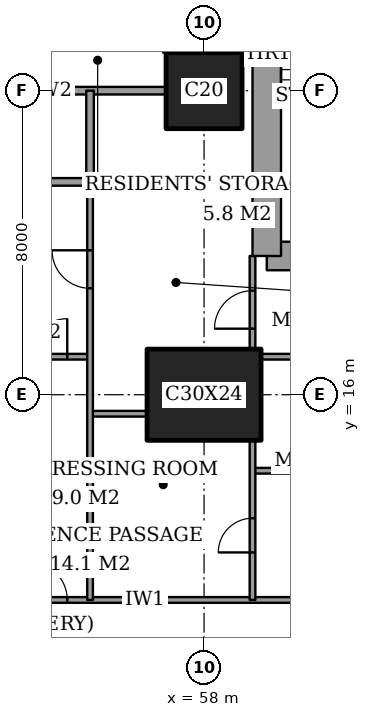
"""IFC4 building model, lengths in metres.
Left out: names, types, materials, properties, quantities, classifications, styles, units other than length and angle.
Written with IfcOpenShell. Run it as: python <this file> out.ifc"""

import sys

from ifc_helpers import new_model, si_unit, direction, frame, frame_2d, origin, origin_2d, place, context, subcontext, project, spatial, rectangle, extrude, element, fill, save


model = new_model("IFC4")
c1 = context("Model", 3, precision=1e-05, world=origin(), true_north=direction((0.0, 1.0)))
c2 = subcontext(c1, "Body", "Model", "MODEL_VIEW")
j1 = project(units=[si_unit("LENGTHUNIT", "METRE"), si_unit("PLANEANGLEUNIT", "RADIAN")], contexts=[c1])
p1 = place(None, origin())
s1 = spatial("IfcSite", under=j1, at=p1, CompositionType="ELEMENT")
p2 = place(p1, origin())
s2 = spatial("IfcBuilding", under=s1, at=p2, CompositionType="ELEMENT")
p3 = place(p2, frame((0.0, 0.0, 58.4)))
s3 = spatial("IfcBuildingStorey", under=s2, at=p3, CompositionType="ELEMENT", Elevation=58.4)
p4 = place(p3, frame((58.0, 16.0, 0.0), z_axis=(0.0, 0.0, 1.0), x_axis=(1.0, 0.0, 0.0)))
e1 = element("IfcColumn", 1, at=p4, inside=s3, PredefinedType="COLUMN", context=c2, shape_type="SweptSolid", body=[
    extrude(rectangle(XDim=3.0, YDim=2.4, at=origin_2d()), origin(), (0.0, 0.0, 1.0), 3.6),
])
p5 = place(p3, frame((58.0, 24.0, 0.0), z_axis=(0.0, 0.0, 1.0), x_axis=(1.0, 0.0, 0.0)))
e2 = element("IfcColumn", 2, at=p5, inside=s3, PredefinedType="COLUMN", context=c2, shape_type="SweptSolid", body=[
    extrude(rectangle(XDim=2.0, YDim=2.0, at=origin_2d()), origin(), (0.0, 0.0, 1.0), 3.6),
])
p6 = place(p3, frame((59.65, 19.65, 0.0), z_axis=(0.0, 0.0, 1.0), x_axis=(1.0, 0.0, 0.0)))
e3 = element("IfcWall", 3, at=p6, inside=s3, PredefinedType="SHEAR", context=c2, shape_type="SweptSolid", body=[
    extrude(rectangle(XDim=4.45, YDim=0.75, at=frame_2d((2.225, 0.0))), origin(), (0.0, 0.0, 1.0), 3.6),
])
p7 = place(p3, frame((59.65, 28.35, 0.0), z_axis=(0.0, 0.0, 1.0), x_axis=(0.0, -1.0, 0.0)))
e4 = element("IfcWall", 4, at=p7, inside=s3, PredefinedType="SHEAR", context=c2, shape_type="SweptSolid", body=[
    extrude(rectangle(XDim=8.7, YDim=0.75, at=frame_2d((4.35, 0.0))), origin(), (0.0, 0.0, 1.0), 3.6),
])
p8 = place(p7, frame((0.975, 0.0, 0.0)))
e5 = element("IfcOpeningElement", 5, at=p8, cuts=e4, PredefinedType="OPENING", context=c2, shape_type="SweptSolid", body=[
    extrude(rectangle(XDim=1.0, YDim=2.1, at=frame_2d((0.5, 1.05))), frame((0.0, 0.385, 0.0), z_axis=(0.0, -1.0, 0.0), x_axis=(1.0, 0.0, 0.0)), (0.0, 0.0, 1.0), 0.77),
])
p9 = place(p3, frame((41.439, 10.6, 0.0), z_axis=(0.0, 0.0, 1.0), x_axis=(1.0, 0.0, 0.0)))
e6 = element("IfcWall", 6, at=p9, inside=s3, PredefinedType="PARTITIONING", context=c2, shape_type="SweptSolid", body=[
    extrude(rectangle(XDim=25.011, YDim=0.15, at=frame_2d((12.505, 0.0))), origin(), (0.0, 0.0, 1.0), 3.35),
])
p10 = place(p9, frame((11.961, 0.0, 0.0)))
e7 = element("IfcOpeningElement", 7, at=p10, cuts=e6, PredefinedType="OPENING", context=c2, shape_type="SweptSolid", body=[
    extrude(rectangle(XDim=1.0, YDim=2.1, at=frame_2d((0.5, 1.05))), frame((0.0, 0.085, 0.0), z_axis=(0.0, -1.0, 0.0), x_axis=(1.0, 0.0, 0.0)), (0.0, 0.0, 1.0), 0.17),
])
p11 = place(p9, frame((20.924, 0.0, 0.0)))
e8 = element("IfcOpeningElement", 8, at=p11, cuts=e6, PredefinedType="OPENING", context=c2, shape_type="SweptSolid", body=[
    extrude(rectangle(XDim=1.0, YDim=2.1, at=frame_2d((0.5, 1.05))), frame((0.0, 0.085, 0.0), z_axis=(0.0, -1.0, 0.0), x_axis=(1.0, 0.0, 0.0)), (0.0, 0.0, 1.0), 0.17),
])
p12 = place(p9, frame((9.561, 0.0, 0.0)))
e9 = element("IfcOpeningElement", 9, at=p12, cuts=e6, PredefinedType="OPENING", context=c2, shape_type="SweptSolid", body=[
    extrude(rectangle(XDim=1.0, YDim=2.1, at=frame_2d((0.5, 1.05))), frame((0.0, 0.085, 0.0), z_axis=(0.0, -1.0, 0.0), x_axis=(1.0, 0.0, 0.0)), (0.0, 0.0, 1.0), 0.17),
])
p13 = place(p9, frame((7.161, 0.0, 0.0)))
e10 = element("IfcOpeningElement", 10, at=p13, cuts=e6, PredefinedType="OPENING", context=c2, shape_type="SweptSolid", body=[
    extrude(rectangle(XDim=1.0, YDim=2.1, at=frame_2d((0.5, 1.05))), frame((0.0, 0.085, 0.0), z_axis=(0.0, -1.0, 0.0), x_axis=(1.0, 0.0, 0.0)), (0.0, 0.0, 1.0), 0.17),
])
p14 = place(p9, frame((2.836, 0.0, 0.0)))
e11 = element("IfcOpeningElement", 11, at=p14, cuts=e6, PredefinedType="OPENING", context=c2, shape_type="SweptSolid", body=[
    extrude(rectangle(XDim=1.0, YDim=2.1, at=frame_2d((0.5, 1.05))), frame((0.0, 0.085, 0.0), z_axis=(0.0, -1.0, 0.0), x_axis=(1.0, 0.0, 0.0)), (0.0, 0.0, 1.0), 0.17),
])
p15 = place(p3, frame((59.275, 14.0, 0.0), z_axis=(0.0, 0.0, 1.0), x_axis=(1.0, 0.0, 0.0)))
e12 = element("IfcWall", 12, at=p15, inside=s3, PredefinedType="PARTITIONING", context=c2, shape_type="SweptSolid", body=[
    extrude(rectangle(XDim=2.6, YDim=0.15, at=frame_2d((1.3, 0.0))), origin(), (0.0, 0.0, 1.0), 3.35),
])
p16 = place(p3, frame((55.0, 15.5, 0.0), z_axis=(0.0, 0.0, 1.0), x_axis=(1.0, 0.0, 0.0)))
e13 = element("IfcWall", 13, at=p16, inside=s3, PredefinedType="PARTITIONING", context=c2, shape_type="SweptSolid", body=[
    extrude(rectangle(XDim=1.5, YDim=0.15, at=frame_2d((0.75, 0.0))), origin(), (0.0, 0.0, 1.0), 3.35),
])
p17 = place(p3, frame((51.6, 17.0, 0.0), z_axis=(0.0, 0.0, 1.0), x_axis=(1.0, 0.0, 0.0)))
e14 = element("IfcWall", 14, at=p17, inside=s3, PredefinedType="PARTITIONING", context=c2, shape_type="SweptSolid", body=[
    extrude(rectangle(XDim=3.4, YDim=0.15, at=frame_2d((1.7, 0.0))), origin(), (0.0, 0.0, 1.0), 3.35),
])
p18 = place(p17, frame((1.8, 0.0, 0.0)))
e15 = element("IfcOpeningElement", 15, at=p18, cuts=e14, PredefinedType="OPENING", context=c2, shape_type="SweptSolid", body=[
    extrude(rectangle(XDim=1.0, YDim=2.1, at=frame_2d((0.5, 1.05))), frame((0.0, 0.085, 0.0), z_axis=(0.0, -1.0, 0.0), x_axis=(1.0, 0.0, 0.0)), (0.0, 0.0, 1.0), 0.17),
])
p19 = place(p3, frame((59.5, 17.0, 0.0), z_axis=(0.0, 0.0, 1.0), x_axis=(1.0, 0.0, 0.0)))
e16 = element("IfcWall", 16, at=p19, inside=s3, PredefinedType="PARTITIONING", context=c2, shape_type="SweptSolid", body=[
    extrude(rectangle(XDim=5.15, YDim=0.15, at=frame_2d((2.575, 0.0))), origin(), (0.0, 0.0, 1.0), 3.35),
])
p20 = place(p3, frame((51.2, 21.6, 0.0), z_axis=(0.0, 0.0, 1.0), x_axis=(1.0, 0.0, 0.0)))
e17 = element("IfcWall", 17, at=p20, inside=s3, PredefinedType="PARTITIONING", context=c2, shape_type="SweptSolid", body=[
    extrude(rectangle(XDim=3.8, YDim=0.2, at=frame_2d((1.9, 0.0))), origin(), (0.0, 0.0, 1.0), 3.35),
])
p21 = place(p20, frame((1.45, 0.0, 0.0)))
e18 = element("IfcOpeningElement", 18, at=p21, cuts=e17, PredefinedType="OPENING", context=c2, shape_type="SweptSolid", body=[
    extrude(rectangle(XDim=0.9, YDim=2.1, at=frame_2d((0.45, 1.05))), frame((0.0, 0.11, 0.0), z_axis=(0.0, -1.0, 0.0), x_axis=(1.0, 0.0, 0.0)), (0.0, 0.0, 1.0), 0.22),
])
p22 = place(p3, frame((51.0, 24.0, 0.0), z_axis=(0.0, 0.0, 1.0), x_axis=(1.0, 0.0, 0.0)))
e19 = element("IfcWall", 19, at=p22, inside=s3, PredefinedType="PARTITIONING", context=c2, shape_type="SweptSolid", body=[
    extrude(rectangle(XDim=6.0, YDim=0.2, at=frame_2d((3.0, 0.0))), origin(), (0.0, 0.0, 1.0), 3.35),
])
p23 = place(p3, frame((55.0, 21.6, 0.0), z_axis=(0.0, 0.0, 1.0), x_axis=(0.0, 1.0, 0.0)))
e20 = element("IfcWall", 20, at=p23, inside=s3, PredefinedType="PARTITIONING", context=c2, shape_type="SweptSolid", body=[
    extrude(rectangle(XDim=2.4, YDim=0.2, at=frame_2d((1.2, 0.0))), origin(), (0.0, 0.0, 1.0), 3.35),
])
p24 = place(p3, frame((55.0, 10.6, 0.0), z_axis=(0.0, 0.0, 1.0), x_axis=(0.0, 1.0, 0.0)))
e21 = element("IfcWall", 21, at=p24, inside=s3, PredefinedType="PARTITIONING", context=c2, shape_type="SweptSolid", body=[
    extrude(rectangle(XDim=11.0, YDim=0.15, at=frame_2d((5.5, 0.0))), origin(), (0.0, 0.0, 1.0), 3.35),
])
p25 = place(p24, frame((8.2, 0.0, 0.0)))
e22 = element("IfcOpeningElement", 22, at=p25, cuts=e21, PredefinedType="OPENING", context=c2, shape_type="SweptSolid", body=[
    extrude(rectangle(XDim=1.0, YDim=2.1, at=frame_2d((0.5, 1.05))), frame((0.0, 0.085, 0.0), z_axis=(0.0, -1.0, 0.0), x_axis=(1.0, 0.0, 0.0)), (0.0, 0.0, 1.0), 0.17),
])
p26 = place(p3, frame((59.275, 10.6, 0.0), z_axis=(0.0, 0.0, 1.0), x_axis=(0.0, 1.0, 0.0)))
e23 = element("IfcWall", 23, at=p26, inside=s3, PredefinedType="PARTITIONING", context=c2, shape_type="SweptSolid", body=[
    extrude(rectangle(XDim=4.2, YDim=0.15, at=frame_2d((2.1, 0.0))), origin(), (0.0, 0.0, 1.0), 3.35),
])
p27 = place(p26, frame((1.25, 0.0, 0.0)))
e24 = element("IfcOpeningElement", 24, at=p27, cuts=e23, PredefinedType="OPENING", context=c2, shape_type="SweptSolid", body=[
    extrude(rectangle(XDim=0.9, YDim=2.1, at=frame_2d((0.45, 1.05))), frame((0.0, 0.085, 0.0), z_axis=(0.0, -1.0, 0.0), x_axis=(1.0, 0.0, 0.0)), (0.0, 0.0, 1.0), 0.17),
])
p28 = place(p3, frame((59.275, 17.2, 0.0), z_axis=(0.0, 0.0, 1.0), x_axis=(0.0, 1.0, 0.0)))
e25 = element("IfcWall", 25, at=p28, inside=s3, PredefinedType="PARTITIONING", context=c2, shape_type="SweptSolid", body=[
    extrude(rectangle(XDim=2.45, YDim=0.15, at=frame_2d((1.225, 0.0))), origin(), (0.0, 0.0, 1.0), 3.35),
])
p29 = place(p28, frame((0.538, 0.0, 0.0)))
e26 = element("IfcOpeningElement", 26, at=p29, cuts=e25, PredefinedType="OPENING", context=c2, shape_type="SweptSolid", body=[
    extrude(rectangle(XDim=1.0, YDim=2.1, at=frame_2d((0.5, 1.05))), frame((0.0, 0.085, 0.0), z_axis=(0.0, -1.0, 0.0), x_axis=(1.0, 0.0, 0.0)), (0.0, 0.0, 1.0), 0.17),
])
p30 = place(p10, origin())
e27 = element("IfcDoor", 27, at=p30, inside=s3, OperationType="SINGLE_SWING_RIGHT", PredefinedType="DOOR", context=c2, shape_type="SweptSolid", body=[
    extrude(rectangle(XDim=1.0, YDim=2.1, at=frame_2d((0.5, 1.05))), frame((0.0, 0.025, 0.0), z_axis=(0.0, -1.0, 0.0), x_axis=(1.0, 0.0, 0.0)), (0.0, 0.0, 1.0), 0.05),
])
fill(e7, e27)
p31 = place(p29, origin())
e28 = element("IfcDoor", 28, at=p31, inside=s3, OperationType="SINGLE_SWING_RIGHT", PredefinedType="DOOR", context=c2, shape_type="SweptSolid", body=[
    extrude(rectangle(XDim=1.0, YDim=2.1, at=frame_2d((0.5, 1.05))), frame((0.0, 0.025, 0.0), z_axis=(0.0, -1.0, 0.0), x_axis=(1.0, 0.0, 0.0)), (0.0, 0.0, 1.0), 0.05),
])
fill(e26, e28)
p32 = place(p27, origin())
e29 = element("IfcDoor", 29, at=p32, inside=s3, OperationType="SINGLE_SWING_RIGHT", PredefinedType="DOOR", context=c2, shape_type="SweptSolid", body=[
    extrude(rectangle(XDim=0.9, YDim=2.1, at=frame_2d((0.45, 1.05))), frame((0.0, 0.025, 0.0), z_axis=(0.0, -1.0, 0.0), x_axis=(1.0, 0.0, 0.0)), (0.0, 0.0, 1.0), 0.05),
])
fill(e24, e29)
p33 = place(p25, origin())
e30 = element("IfcDoor", 30, at=p33, inside=s3, OperationType="SINGLE_SWING_LEFT", PredefinedType="DOOR", context=c2, shape_type="SweptSolid", body=[
    extrude(rectangle(XDim=1.0, YDim=2.1, at=frame_2d((0.5, 1.05))), frame((0.0, 0.025, 0.0), z_axis=(0.0, -1.0, 0.0), x_axis=(1.0, 0.0, 0.0)), (0.0, 0.0, 1.0), 0.05),
])
fill(e22, e30)
p34 = place(p18, origin())
e31 = element("IfcDoor", 31, at=p34, inside=s3, OperationType="SINGLE_SWING_LEFT", PredefinedType="DOOR", context=c2, shape_type="SweptSolid", body=[
    extrude(rectangle(XDim=1.0, YDim=2.1, at=frame_2d((0.5, 1.05))), frame((0.0, 0.025, 0.0), z_axis=(0.0, -1.0, 0.0), x_axis=(1.0, 0.0, 0.0)), (0.0, 0.0, 1.0), 0.05),
])
fill(e15, e31)
save(model, sys.argv[1])
